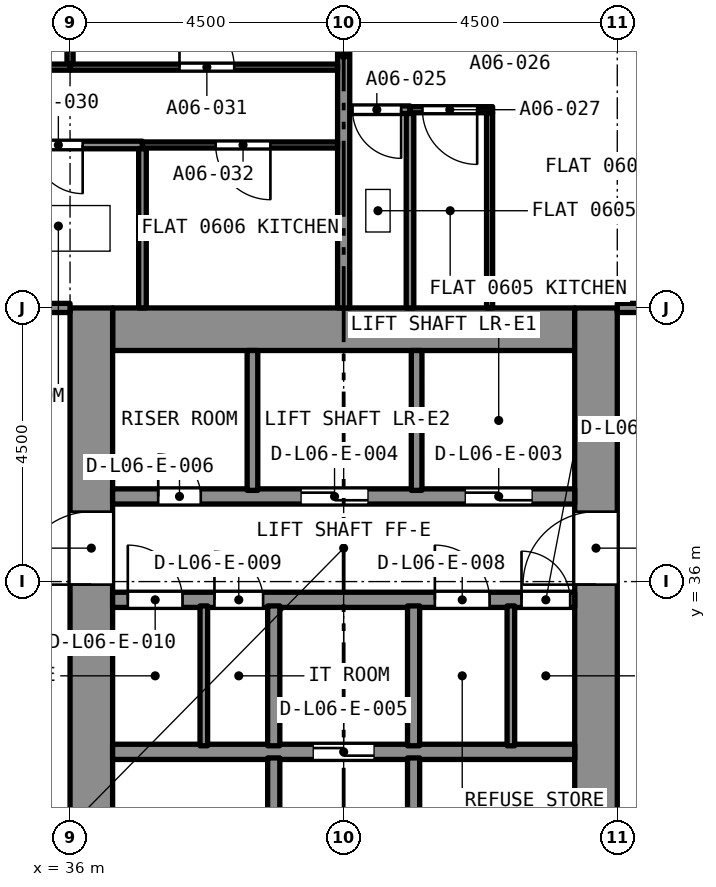
"""IFC4 building model, lengths in metres.
Left out: names, types, materials, properties, quantities, classifications, styles, units other than length and angle.
Written with IfcOpenShell. Run it as: python <this file> out.ifc"""

import sys

from ifc_helpers import new_model, si_unit, direction, frame, frame_2d, origin, place, context, subcontext, project, spatial, rectangle, extrude, element, fill, save


model = new_model("IFC4")
c1 = context("Model", 3, precision=1e-05, world=origin(), true_north=direction((0.0, 1.0)))
c2 = subcontext(c1, "Body", "Model", "MODEL_VIEW")
j1 = project(units=[si_unit("LENGTHUNIT", "METRE"), si_unit("PLANEANGLEUNIT", "RADIAN")], contexts=[c1])
p1 = place(None, origin())
s1 = spatial("IfcSite", under=j1, at=p1, CompositionType="ELEMENT")
p2 = place(p1, origin())
s2 = spatial("IfcBuilding", under=s1, at=p2, CompositionType="ELEMENT")
p3 = place(p2, frame((0.0, 0.0, 30.4)))
s3 = spatial("IfcBuildingStorey", under=s2, at=p3, CompositionType="ELEMENT", Elevation=30.4)
p4 = place(p3, frame((36.7, 40.15, 0.0), z_axis=(0.0, 0.0, 1.0), x_axis=(1.0, 0.0, 0.0)))
e1 = element("IfcWall", 1, at=p4, inside=s3, PredefinedType="SOLIDWALL", context=c2, shape_type="SweptSolid", body=[
    extrude(rectangle(XDim=7.6, YDim=0.7, at=frame_2d((3.8, 0.0))), origin(), (0.0, 0.0, 1.0), 3.2),
])
p5 = place(p3, frame((36.35, 27.0, 0.0), z_axis=(0.0, 0.0, 1.0), x_axis=(0.0, 1.0, 0.0)))
e2 = element("IfcWall", 2, at=p5, inside=s3, PredefinedType="SOLIDWALL", context=c2, shape_type="SweptSolid", body=[
    extrude(rectangle(XDim=13.5, YDim=0.7, at=frame_2d((6.75, 0.0))), origin(), (0.0, 0.0, 1.0), 3.2),
])
p6 = place(p5, frame((8.95, 0.0, 0.0)))
e3 = element("IfcOpeningElement", 3, at=p6, cuts=e2, PredefinedType="OPENING", context=c2, shape_type="SweptSolid", body=[
    extrude(rectangle(XDim=1.2, YDim=2.1, at=frame_2d((0.6, 1.05))), frame((0.0, 0.36, 0.0), z_axis=(0.0, -1.0, 0.0), x_axis=(1.0, 0.0, 0.0)), (0.0, 0.0, 1.0), 0.72),
])
p7 = place(p3, frame((44.65, 27.0, 0.0), z_axis=(0.0, 0.0, 1.0), x_axis=(0.0, 1.0, 0.0)))
e4 = element("IfcWall", 4, at=p7, inside=s3, PredefinedType="SOLIDWALL", context=c2, shape_type="SweptSolid", body=[
    extrude(rectangle(XDim=13.5, YDim=0.7, at=frame_2d((6.75, 0.0))), origin(), (0.0, 0.0, 1.0), 3.2),
])
p8 = place(p7, frame((8.95, 0.0, 0.0)))
e5 = element("IfcOpeningElement", 5, at=p8, cuts=e4, PredefinedType="OPENING", context=c2, shape_type="SweptSolid", body=[
    extrude(rectangle(XDim=1.2, YDim=2.1, at=frame_2d((0.6, 1.05))), frame((0.0, 0.36, 0.0), z_axis=(0.0, -1.0, 0.0), x_axis=(1.0, 0.0, 0.0)), (0.0, 0.0, 1.0), 0.72),
])
p9 = place(p3, frame((41.591, 43.76, 0.0), z_axis=(0.0, 0.0, 1.0), x_axis=(-1.0, 0.0, 0.0)))
e6 = element("IfcWall", 6, at=p9, inside=s3, PredefinedType="PARTITIONING", context=c2, shape_type="SweptSolid", body=[
    extrude(rectangle(XDim=0.991, YDim=0.125, at=frame_2d((0.495, 0.0))), origin(), (0.0, 0.0, 1.0), 2.9),
])
p10 = place(p9, frame((0.146, 0.0, 0.0)))
e7 = element("IfcOpeningElement", 7, at=p10, cuts=e6, PredefinedType="OPENING", context=c2, shape_type="SweptSolid", body=[
    extrude(rectangle(XDim=0.8, YDim=2.1, at=frame_2d((0.4, 1.05))), frame((0.0, 0.073, 0.0), z_axis=(0.0, -1.0, 0.0), x_axis=(1.0, 0.0, 0.0)), (0.0, 0.0, 1.0), 0.145),
])
p11 = place(p3, frame((41.591, 40.5, 0.0), z_axis=(0.0, 0.0, 1.0), x_axis=(0.0, 1.0, 0.0)))
e8 = element("IfcWall", 8, at=p11, inside=s3, PredefinedType="PARTITIONING", context=c2, shape_type="SweptSolid", body=[
    extrude(rectangle(XDim=3.198, YDim=0.125, at=frame_2d((1.599, 0.0))), origin(), (0.0, 0.0, 1.0), 2.9),
])
p12 = place(p3, frame((40.5, 40.5, 0.0), z_axis=(0.0, 0.0, 1.0), x_axis=(0.0, 1.0, 0.0)))
e9 = element("IfcWall", 9, at=p12, inside=s3, PredefinedType="PARTITIONING", context=c2, shape_type="SweptSolid", body=[
    extrude(rectangle(XDim=8.3, YDim=0.2, at=frame_2d((4.15, 0.0))), origin(), (0.0, 0.0, 1.0), 2.9),
])
p13 = place(p3, frame((42.9, 40.5, 0.0), z_axis=(0.0, 0.0, 1.0), x_axis=(0.0, 1.0, 0.0)))
e10 = element("IfcWall", 10, at=p13, inside=s3, PredefinedType="PARTITIONING", context=c2, shape_type="SweptSolid", body=[
    extrude(rectangle(XDim=3.21, YDim=0.1, at=frame_2d((1.605, 0.0))), origin(), (0.0, 0.0, 1.0), 2.9),
])
p14 = place(p3, frame((42.95, 43.76, 0.0), z_axis=(0.0, 0.0, 1.0), x_axis=(-1.0, 0.0, 0.0)))
e11 = element("IfcWall", 11, at=p14, inside=s3, PredefinedType="PARTITIONING", context=c2, shape_type="SweptSolid", body=[
    extrude(rectangle(XDim=1.359, YDim=0.1, at=frame_2d((0.68, 0.0))), origin(), (0.0, 0.0, 1.0), 2.9),
])
p15 = place(p14, frame((0.254, 0.0, 0.0)))
e12 = element("IfcOpeningElement", 12, at=p15, cuts=e11, PredefinedType="OPENING", context=c2, shape_type="SweptSolid", body=[
    extrude(rectangle(XDim=0.9, YDim=2.1, at=frame_2d((0.45, 1.05))), frame((0.0, 0.06, 0.0), z_axis=(0.0, -1.0, 0.0), x_axis=(1.0, 0.0, 0.0)), (0.0, 0.0, 1.0), 0.12),
])
p16 = place(p3, frame((45.0, 40.5, 0.0), z_axis=(0.0, 0.0, 1.0), x_axis=(1.0, 0.0, 0.0)))
e13 = element("IfcWall", 13, at=p16, inside=s3, PredefinedType="PARTITIONING", context=c2, shape_type="SweptSolid", body=[
    extrude(rectangle(XDim=3.8, YDim=0.15, at=frame_2d((1.9, 0.0))), origin(), (0.0, 0.0, 1.0), 2.9),
])
p17 = place(p16, frame((1.75, 0.0, 0.0)))
e14 = element("IfcOpeningElement", 14, at=p17, cuts=e13, PredefinedType="OPENING", context=c2, shape_type="SweptSolid", body=[
    extrude(rectangle(XDim=1.0, YDim=2.1, at=frame_2d((0.5, 1.05))), frame((0.0, 0.085, 0.0), z_axis=(0.0, -1.0, 0.0), x_axis=(1.0, 0.0, 0.0)), (0.0, 0.0, 1.0), 0.17),
])
p18 = place(p3, frame((37.19, 43.18, 0.0), z_axis=(0.0, 0.0, 1.0), x_axis=(-1.0, 0.0, 0.0)))
e15 = element("IfcWall", 15, at=p18, inside=s3, PredefinedType="PARTITIONING", context=c2, shape_type="SweptSolid", body=[
    extrude(rectangle(XDim=2.828, YDim=0.125, at=frame_2d((1.414, 0.0))), origin(), (0.0, 0.0, 1.0), 2.9),
])
p19 = place(p18, frame((0.983, 0.0, 0.0)))
e16 = element("IfcOpeningElement", 16, at=p19, cuts=e15, PredefinedType="OPENING", context=c2, shape_type="SweptSolid", body=[
    extrude(rectangle(XDim=0.8, YDim=2.1, at=frame_2d((0.4, 1.05))), frame((0.0, 0.073, 0.0), z_axis=(0.0, -1.0, 0.0), x_axis=(1.0, 0.0, 0.0)), (0.0, 0.0, 1.0), 0.145),
])
p20 = place(p3, frame((37.191, 40.5, 0.0), z_axis=(0.0, 0.0, 1.0), x_axis=(0.0, 1.0, 0.0)))
e17 = element("IfcWall", 17, at=p20, inside=s3, PredefinedType="PARTITIONING", context=c2, shape_type="SweptSolid", body=[
    extrude(rectangle(XDim=2.617, YDim=0.125, at=frame_2d((1.309, 0.0))), origin(), (0.0, 0.0, 1.0), 2.9),
])
p21 = place(p3, frame((34.425, 40.5, 0.0), z_axis=(0.0, 0.0, 1.0), x_axis=(1.0, 0.0, 0.0)))
e18 = element("IfcWall", 18, at=p21, inside=s3, PredefinedType="PARTITIONING", context=c2, shape_type="SweptSolid", body=[
    extrude(rectangle(XDim=1.575, YDim=0.15, at=frame_2d((0.788, 0.0))), origin(), (0.0, 0.0, 1.0), 2.9),
])
p22 = place(p3, frame((36.0, 44.46, 0.0), z_axis=(0.0, 0.0, 1.0), x_axis=(1.0, 0.0, 0.0)))
e19 = element("IfcWall", 19, at=p22, inside=s3, PredefinedType="PARTITIONING", context=c2, shape_type="SweptSolid", body=[
    extrude(rectangle(XDim=4.4, YDim=0.1, at=frame_2d((2.2, 0.0))), origin(), (0.0, 0.0, 1.0), 2.9),
])
p23 = place(p22, frame((1.8, 0.0, 0.0)))
e20 = element("IfcOpeningElement", 20, at=p23, cuts=e19, PredefinedType="OPENING", context=c2, shape_type="SweptSolid", body=[
    extrude(rectangle(XDim=0.9, YDim=2.1, at=frame_2d((0.45, 1.05))), frame((0.0, 0.06, 0.0), z_axis=(0.0, -1.0, 0.0), x_axis=(1.0, 0.0, 0.0)), (0.0, 0.0, 1.0), 0.12),
])
p24 = place(p3, frame((36.0, 44.51, 0.0), z_axis=(0.0, 0.0, 1.0), x_axis=(0.0, 1.0, 0.0)))
e21 = element("IfcWall", 21, at=p24, inside=s3, PredefinedType="PARTITIONING", context=c2, shape_type="SweptSolid", body=[
    extrude(rectangle(XDim=4.29, YDim=0.1, at=frame_2d((2.145, 0.0))), origin(), (0.0, 0.0, 1.0), 2.9),
])
p25 = place(p3, frame((40.4, 43.18, 0.0), z_axis=(0.0, 0.0, 1.0), x_axis=(-1.0, 0.0, 0.0)))
e22 = element("IfcWall", 22, at=p25, inside=s3, PredefinedType="PARTITIONING", context=c2, shape_type="SweptSolid", body=[
    extrude(rectangle(XDim=3.209, YDim=0.1, at=frame_2d((1.605, 0.0))), origin(), (0.0, 0.0, 1.0), 2.9),
])
p26 = place(p25, frame((1.105, 0.0, 0.0)))
e23 = element("IfcOpeningElement", 23, at=p26, cuts=e22, PredefinedType="OPENING", context=c2, shape_type="SweptSolid", body=[
    extrude(rectangle(XDim=0.9, YDim=2.1, at=frame_2d((0.45, 1.05))), frame((0.0, 0.06, 0.0), z_axis=(0.0, -1.0, 0.0), x_axis=(1.0, 0.0, 0.0)), (0.0, 0.0, 1.0), 0.12),
])
p27 = place(p3, frame((32.2, 44.46, 0.0), z_axis=(0.0, 0.0, 1.0), x_axis=(1.0, 0.0, 0.0)))
e24 = element("IfcWall", 24, at=p27, inside=s3, PredefinedType="PARTITIONING", context=c2, shape_type="SweptSolid", body=[
    extrude(rectangle(XDim=3.8, YDim=0.1, at=frame_2d((1.9, 0.0))), origin(), (0.0, 0.0, 1.0), 2.9),
])
p28 = place(p27, frame((1.05, 0.0, 0.0)))
e25 = element("IfcOpeningElement", 25, at=p28, cuts=e24, PredefinedType="OPENING", context=c2, shape_type="SweptSolid", body=[
    extrude(rectangle(XDim=1.0, YDim=2.1, at=frame_2d((0.5, 1.05))), frame((0.0, 0.06, 0.0), z_axis=(0.0, -1.0, 0.0), x_axis=(1.0, 0.0, 0.0)), (0.0, 0.0, 1.0), 0.12),
])
p29 = place(p3, frame((36.7, 33.2, 0.0), z_axis=(0.0, 0.0, 1.0), x_axis=(1.0, 0.0, 0.0)))
e26 = element("IfcWall", 26, at=p29, inside=s3, PredefinedType="SOLIDWALL", context=c2, shape_type="SweptSolid", body=[
    extrude(rectangle(XDim=7.6, YDim=0.25, at=frame_2d((3.8, 0.0))), origin(), (0.0, 0.0, 1.0), 2.9),
])
p30 = place(p29, frame((3.3, 0.0, 0.0)))
e27 = element("IfcOpeningElement", 27, at=p30, cuts=e26, PredefinedType="OPENING", context=c2, shape_type="SweptSolid", body=[
    extrude(rectangle(XDim=1.0, YDim=2.1, at=frame_2d((0.5, 1.05))), frame((0.0, 0.135, 0.0), z_axis=(0.0, -1.0, 0.0), x_axis=(1.0, 0.0, 0.0)), (0.0, 0.0, 1.0), 0.27),
])
p31 = place(p3, frame((36.7, 35.7, 0.0), z_axis=(0.0, 0.0, 1.0), x_axis=(1.0, 0.0, 0.0)))
e28 = element("IfcWall", 28, at=p31, inside=s3, PredefinedType="SOLIDWALL", context=c2, shape_type="SweptSolid", body=[
    extrude(rectangle(XDim=7.6, YDim=0.25, at=frame_2d((3.8, 0.0))), origin(), (0.0, 0.0, 1.0), 2.9),
])
p32 = place(p31, frame((6.725, 0.0, 0.0)))
e29 = element("IfcOpeningElement", 29, at=p32, cuts=e28, PredefinedType="OPENING", context=c2, shape_type="SweptSolid", body=[
    extrude(rectangle(XDim=0.8, YDim=2.1, at=frame_2d((0.4, 1.05))), frame((0.0, 0.135, 0.0), z_axis=(0.0, -1.0, 0.0), x_axis=(1.0, 0.0, 0.0)), (0.0, 0.0, 1.0), 0.27),
])
p33 = place(p31, frame((5.3, 0.0, 0.0)))
e30 = element("IfcOpeningElement", 30, at=p33, cuts=e28, PredefinedType="OPENING", context=c2, shape_type="SweptSolid", body=[
    extrude(rectangle(XDim=0.9, YDim=2.1, at=frame_2d((0.45, 1.05))), frame((0.0, 0.135, 0.0), z_axis=(0.0, -1.0, 0.0), x_axis=(1.0, 0.0, 0.0)), (0.0, 0.0, 1.0), 0.27),
])
p34 = place(p31, frame((1.675, 0.0, 0.0)))
e31 = element("IfcOpeningElement", 31, at=p34, cuts=e28, PredefinedType="OPENING", context=c2, shape_type="SweptSolid", body=[
    extrude(rectangle(XDim=0.8, YDim=2.1, at=frame_2d((0.4, 1.05))), frame((0.0, 0.135, 0.0), z_axis=(0.0, -1.0, 0.0), x_axis=(1.0, 0.0, 0.0)), (0.0, 0.0, 1.0), 0.27),
])
p35 = place(p31, frame((0.25, 0.0, 0.0)))
e32 = element("IfcOpeningElement", 32, at=p35, cuts=e28, PredefinedType="OPENING", context=c2, shape_type="SweptSolid", body=[
    extrude(rectangle(XDim=0.9, YDim=2.1, at=frame_2d((0.45, 1.05))), frame((0.0, 0.135, 0.0), z_axis=(0.0, -1.0, 0.0), x_axis=(1.0, 0.0, 0.0)), (0.0, 0.0, 1.0), 0.27),
])
p36 = place(p3, frame((36.7, 37.4, 0.0), z_axis=(0.0, 0.0, 1.0), x_axis=(1.0, 0.0, 0.0)))
e33 = element("IfcWall", 33, at=p36, inside=s3, PredefinedType="SOLIDWALL", context=c2, shape_type="SweptSolid", body=[
    extrude(rectangle(XDim=7.6, YDim=0.25, at=frame_2d((3.8, 0.0))), origin(), (0.0, 0.0, 1.0), 2.9),
])
p37 = place(p36, frame((5.8, 0.0, 0.0)))
e34 = element("IfcOpeningElement", 34, at=p37, cuts=e33, PredefinedType="OPENING", context=c2, shape_type="SweptSolid", body=[
    extrude(rectangle(XDim=1.1, YDim=2.4, at=frame_2d((0.55, 1.2))), frame((0.0, 0.135, 0.0), z_axis=(0.0, -1.0, 0.0), x_axis=(1.0, 0.0, 0.0)), (0.0, 0.0, 1.0), 0.27),
])
p38 = place(p36, frame((3.1, 0.0, 0.0)))
e35 = element("IfcOpeningElement", 35, at=p38, cuts=e33, PredefinedType="OPENING", context=c2, shape_type="SweptSolid", body=[
    extrude(rectangle(XDim=1.1, YDim=2.4, at=frame_2d((0.55, 1.2))), frame((0.0, 0.135, 0.0), z_axis=(0.0, -1.0, 0.0), x_axis=(1.0, 0.0, 0.0)), (0.0, 0.0, 1.0), 0.27),
])
p39 = place(p36, frame((0.75, 0.0, 0.0)))
e36 = element("IfcOpeningElement", 36, at=p39, cuts=e33, PredefinedType="OPENING", context=c2, shape_type="SweptSolid", body=[
    extrude(rectangle(XDim=0.7, YDim=2.1, at=frame_2d((0.35, 1.05))), frame((0.0, 0.135, 0.0), z_axis=(0.0, -1.0, 0.0), x_axis=(1.0, 0.0, 0.0)), (0.0, 0.0, 1.0), 0.27),
])
p40 = place(p3, frame((41.65, 27.7, 0.0), z_axis=(0.0, 0.0, 1.0), x_axis=(0.0, 1.0, 0.0)))
e37 = element("IfcWall", 37, at=p40, inside=s3, PredefinedType="SOLIDWALL", context=c2, shape_type="SweptSolid", body=[
    extrude(rectangle(XDim=5.4, YDim=0.2, at=frame_2d((2.7, 0.0))), origin(), (0.0, 0.0, 1.0), 2.9),
])
p41 = place(p40, frame((0.2, 0.0, 0.0)))
e38 = element("IfcOpeningElement", 38, at=p41, cuts=e37, PredefinedType="OPENING", context=c2, shape_type="SweptSolid", body=[
    extrude(rectangle(XDim=0.9, YDim=2.1, at=frame_2d((0.45, 1.05))), frame((0.0, 0.11, 0.0), z_axis=(0.0, -1.0, 0.0), x_axis=(1.0, 0.0, 0.0)), (0.0, 0.0, 1.0), 0.22),
])
p42 = place(p3, frame((39.35, 27.7, 0.0), z_axis=(0.0, 0.0, 1.0), x_axis=(0.0, 1.0, 0.0)))
e39 = element("IfcWall", 39, at=p42, inside=s3, PredefinedType="SOLIDWALL", context=c2, shape_type="SweptSolid", body=[
    extrude(rectangle(XDim=5.4, YDim=0.2, at=frame_2d((2.7, 0.0))), origin(), (0.0, 0.0, 1.0), 2.9),
])
p43 = place(p42, frame((0.2, 0.0, 0.0)))
e40 = element("IfcOpeningElement", 40, at=p43, cuts=e39, PredefinedType="OPENING", context=c2, shape_type="SweptSolid", body=[
    extrude(rectangle(XDim=0.9, YDim=2.1, at=frame_2d((0.45, 1.05))), frame((0.0, 0.11, 0.0), z_axis=(0.0, -1.0, 0.0), x_axis=(1.0, 0.0, 0.0)), (0.0, 0.0, 1.0), 0.22),
])
for number, where, z_axis, x_axis in (
    (41, (41.65, 33.3, 0.0), (0.0, 0.0, 1.0), (0.0, 1.0, 0.0)),
    (42, (39.35, 33.3, 0.0), (0.0, 0.0, 1.0), (0.0, 1.0, 0.0)),
):
    element("IfcWall", number, at=place(p3, frame(where, z_axis=z_axis, x_axis=x_axis)), inside=s3, PredefinedType="SOLIDWALL", context=c2, shape_type="SweptSolid", body=[
        extrude(rectangle(XDim=2.3, YDim=0.2, at=frame_2d((1.15, 0.0))), origin(), (0.0, 0.0, 1.0), 2.9),
    ])
for number, where, z_axis, x_axis in (
    (43, (41.7, 37.5, 0.0), (0.0, 0.0, 1.0), (0.0, 1.0, 0.0)),
    (44, (39.0, 37.5, 0.0), (0.0, 0.0, 1.0), (0.0, 1.0, 0.0)),
):
    element("IfcWall", number, at=place(p3, frame(where, z_axis=z_axis, x_axis=x_axis)), inside=s3, PredefinedType="SOLIDWALL", context=c2, shape_type="SweptSolid", body=[
        extrude(rectangle(XDim=2.3, YDim=0.175, at=frame_2d((1.15, 0.0))), origin(), (0.0, 0.0, 1.0), 2.9),
    ])
for number, where, z_axis, x_axis in (
    (45, (43.25, 33.3, 0.0), (0.0, 0.0, 1.0), (0.0, 1.0, 0.0)),
    (46, (38.2, 33.3, 0.0), (0.0, 0.0, 1.0), (0.0, 1.0, 0.0)),
):
    element("IfcWall", number, at=place(p3, frame(where, z_axis=z_axis, x_axis=x_axis)), inside=s3, PredefinedType="PARTITIONING", context=c2, shape_type="SweptSolid", body=[
        extrude(rectangle(XDim=2.3, YDim=0.125, at=frame_2d((1.15, 0.0))), origin(), (0.0, 0.0, 1.0), 2.9),
    ])
p44 = place(p10, origin())
e47 = element("IfcDoor", 47, at=p44, inside=s3, OperationType="SINGLE_SWING_RIGHT", PredefinedType="DOOR", context=c2, shape_type="SweptSolid", body=[
    extrude(rectangle(XDim=0.8, YDim=2.1, at=frame_2d((0.4, 1.05))), frame((0.0, 0.025, 0.0), z_axis=(0.0, -1.0, 0.0), x_axis=(1.0, 0.0, 0.0)), (0.0, 0.0, 1.0), 0.05),
])
fill(e7, e47)
p45 = place(p15, origin())
e48 = element("IfcDoor", 48, at=p45, inside=s3, OperationType="SINGLE_SWING_RIGHT", PredefinedType="DOOR", context=c2, shape_type="SweptSolid", body=[
    extrude(rectangle(XDim=0.9, YDim=2.1, at=frame_2d((0.45, 1.05))), frame((0.0, 0.025, 0.0), z_axis=(0.0, -1.0, 0.0), x_axis=(1.0, 0.0, 0.0)), (0.0, 0.0, 1.0), 0.05),
])
fill(e12, e48)
p46 = place(p19, origin())
e49 = element("IfcDoor", 49, at=p46, inside=s3, OperationType="SINGLE_SWING_LEFT", PredefinedType="DOOR", context=c2, shape_type="SweptSolid", body=[
    extrude(rectangle(XDim=0.8, YDim=2.1, at=frame_2d((0.4, 1.05))), frame((0.0, 0.025, 0.0), z_axis=(0.0, -1.0, 0.0), x_axis=(1.0, 0.0, 0.0)), (0.0, 0.0, 1.0), 0.05),
])
fill(e16, e49)
p47 = place(p23, origin())
e50 = element("IfcDoor", 50, at=p47, inside=s3, OperationType="SINGLE_SWING_RIGHT", PredefinedType="DOOR", context=c2, shape_type="SweptSolid", body=[
    extrude(rectangle(XDim=0.9, YDim=2.1, at=frame_2d((0.45, 1.05))), frame((0.0, 0.025, 0.0), z_axis=(0.0, -1.0, 0.0), x_axis=(1.0, 0.0, 0.0)), (0.0, 0.0, 1.0), 0.05),
])
fill(e20, e50)
p48 = place(p26, origin())
e51 = element("IfcDoor", 51, at=p48, inside=s3, OperationType="SINGLE_SWING_LEFT", PredefinedType="DOOR", context=c2, shape_type="SweptSolid", body=[
    extrude(rectangle(XDim=0.9, YDim=2.1, at=frame_2d((0.45, 1.05))), frame((0.0, 0.025, 0.0), z_axis=(0.0, -1.0, 0.0), x_axis=(1.0, 0.0, 0.0)), (0.0, 0.0, 1.0), 0.05),
])
fill(e23, e51)
p49 = place(p37, origin())
e52 = element("IfcDoor", 52, at=p49, inside=s3, OperationType="SLIDING_TO_LEFT", PredefinedType="DOOR", context=c2, shape_type="SweptSolid", body=[
    extrude(rectangle(XDim=1.1, YDim=2.4, at=frame_2d((0.55, 1.2))), frame((0.0, 0.025, 0.0), z_axis=(0.0, -1.0, 0.0), x_axis=(1.0, 0.0, 0.0)), (0.0, 0.0, 1.0), 0.05),
])
fill(e34, e52)
p50 = place(p38, origin())
e53 = element("IfcDoor", 53, at=p50, inside=s3, OperationType="SLIDING_TO_LEFT", PredefinedType="DOOR", context=c2, shape_type="SweptSolid", body=[
    extrude(rectangle(XDim=1.1, YDim=2.4, at=frame_2d((0.55, 1.2))), frame((0.0, 0.025, 0.0), z_axis=(0.0, -1.0, 0.0), x_axis=(1.0, 0.0, 0.0)), (0.0, 0.0, 1.0), 0.05),
])
fill(e35, e53)
p51 = place(p30, origin())
e54 = element("IfcDoor", 54, at=p51, inside=s3, OperationType="SLIDING_TO_LEFT", PredefinedType="DOOR", context=c2, shape_type="SweptSolid", body=[
    extrude(rectangle(XDim=1.0, YDim=2.1, at=frame_2d((0.5, 1.05))), frame((0.0, 0.025, 0.0), z_axis=(0.0, -1.0, 0.0), x_axis=(1.0, 0.0, 0.0)), (0.0, 0.0, 1.0), 0.05),
])
fill(e27, e54)
p52 = place(p39, origin())
e55 = element("IfcDoor", 55, at=p52, inside=s3, OperationType="SINGLE_SWING_LEFT", PredefinedType="DOOR", context=c2, shape_type="SweptSolid", body=[
    extrude(rectangle(XDim=0.7, YDim=2.1, at=frame_2d((0.35, 1.05))), frame((0.0, 0.025, 0.0), z_axis=(0.0, -1.0, 0.0), x_axis=(1.0, 0.0, 0.0)), (0.0, 0.0, 1.0), 0.05),
])
fill(e36, e55)
p53 = place(p32, origin())
e56 = element("IfcDoor", 56, at=p53, inside=s3, OperationType="SINGLE_SWING_LEFT", PredefinedType="DOOR", context=c2, shape_type="SweptSolid", body=[
    extrude(rectangle(XDim=0.8, YDim=2.1, at=frame_2d((0.4, 1.05))), frame((0.0, 0.025, 0.0), z_axis=(0.0, -1.0, 0.0), x_axis=(1.0, 0.0, 0.0)), (0.0, 0.0, 1.0), 0.05),
])
fill(e29, e56)
p54 = place(p33, origin())
e57 = element("IfcDoor", 57, at=p54, inside=s3, OperationType="SINGLE_SWING_LEFT", PredefinedType="DOOR", context=c2, shape_type="SweptSolid", body=[
    extrude(rectangle(XDim=0.9, YDim=2.1, at=frame_2d((0.45, 1.05))), frame((0.0, 0.025, 0.0), z_axis=(0.0, -1.0, 0.0), x_axis=(1.0, 0.0, 0.0)), (0.0, 0.0, 1.0), 0.05),
])
fill(e30, e57)
p55 = place(p34, origin())
e58 = element("IfcDoor", 58, at=p55, inside=s3, OperationType="SINGLE_SWING_LEFT", PredefinedType="DOOR", context=c2, shape_type="SweptSolid", body=[
    extrude(rectangle(XDim=0.8, YDim=2.1, at=frame_2d((0.4, 1.05))), frame((0.0, 0.025, 0.0), z_axis=(0.0, -1.0, 0.0), x_axis=(1.0, 0.0, 0.0)), (0.0, 0.0, 1.0), 0.05),
])
fill(e31, e58)
p56 = place(p35, origin())
e59 = element("IfcDoor", 59, at=p56, inside=s3, OperationType="SINGLE_SWING_LEFT", PredefinedType="DOOR", context=c2, shape_type="SweptSolid", body=[
    extrude(rectangle(XDim=0.9, YDim=2.1, at=frame_2d((0.45, 1.05))), frame((0.0, 0.025, 0.0), z_axis=(0.0, -1.0, 0.0), x_axis=(1.0, 0.0, 0.0)), (0.0, 0.0, 1.0), 0.05),
])
fill(e32, e59)
p57 = place(p6, origin())
e60 = element("IfcDoor", 60, at=p57, inside=s3, OperationType="SINGLE_SWING_LEFT", PredefinedType="DOOR", context=c2, shape_type="SweptSolid", body=[
    extrude(rectangle(XDim=1.2, YDim=2.1, at=frame_2d((0.6, 1.05))), frame((0.0, 0.025, 0.0), z_axis=(0.0, -1.0, 0.0), x_axis=(1.0, 0.0, 0.0)), (0.0, 0.0, 1.0), 0.05),
])
fill(e3, e60)
p58 = place(p8, origin())
e61 = element("IfcDoor", 61, at=p58, inside=s3, OperationType="SINGLE_SWING_LEFT", PredefinedType="DOOR", context=c2, shape_type="SweptSolid", body=[
    extrude(rectangle(XDim=1.2, YDim=2.1, at=frame_2d((0.6, 1.05))), frame((0.0, 0.025, 0.0), z_axis=(0.0, -1.0, 0.0), x_axis=(1.0, 0.0, 0.0)), (0.0, 0.0, 1.0), 0.05),
])
fill(e5, e61)
save(model, sys.argv[1])
